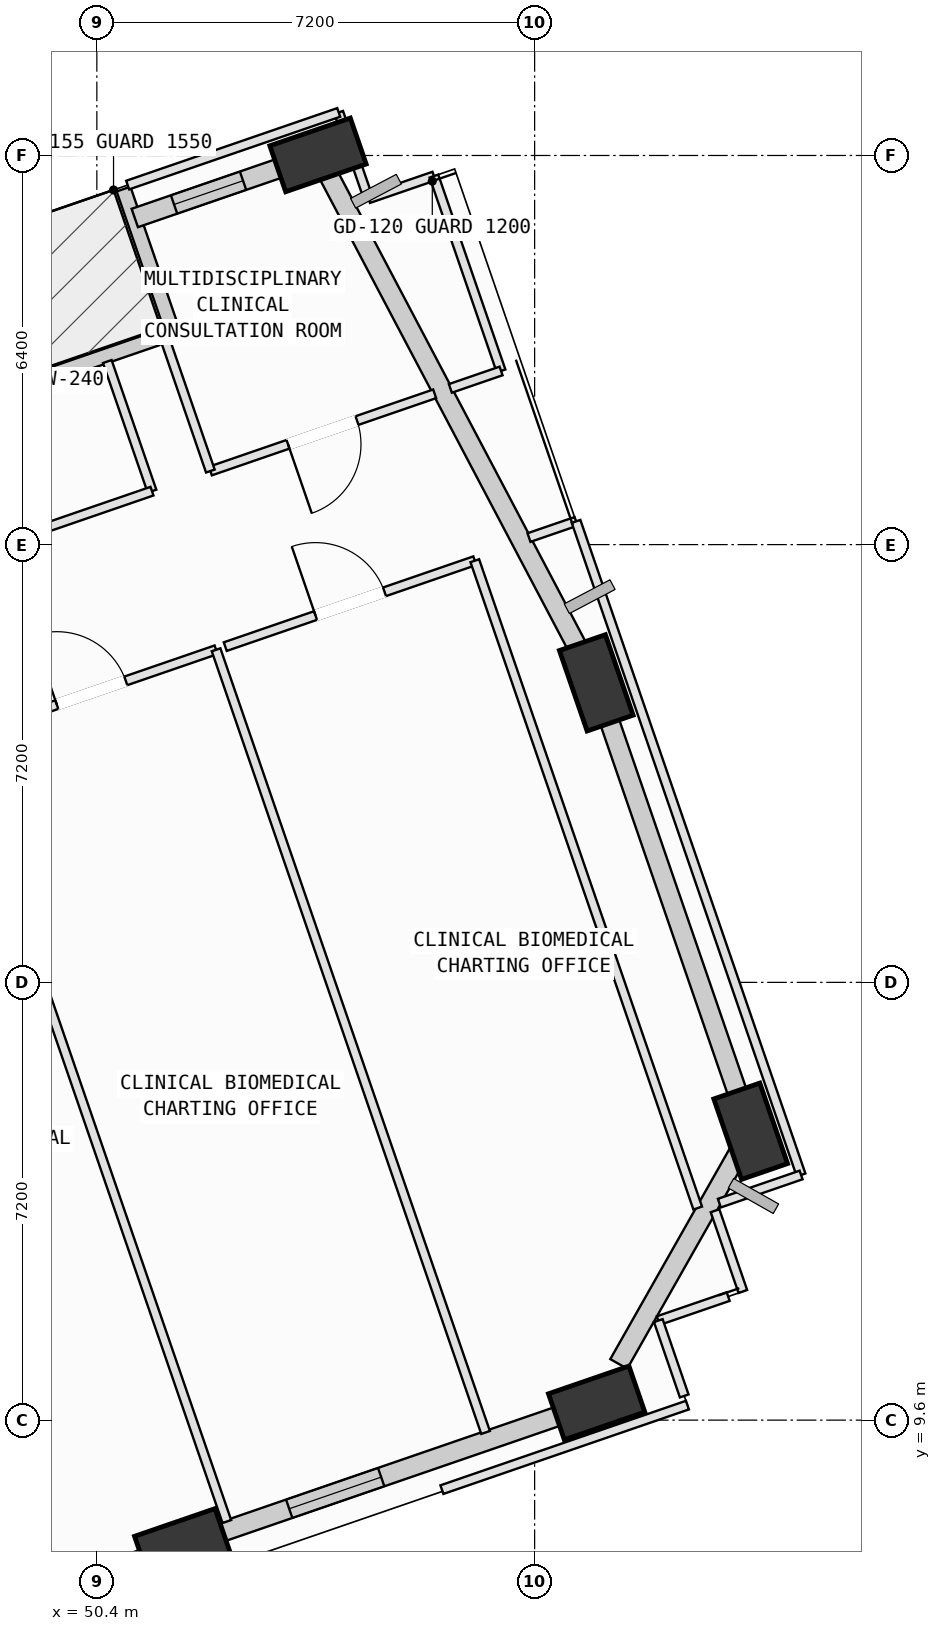
"""IFC4 building model, lengths in metres.
Left out: names, types, materials, properties, quantities, classifications, styles, units other than length and angle.
Written with IfcOpenShell. Run it as: python <this file> out.ifc"""

import sys

from ifc_helpers import new_model, si_unit, direction, frame, frame_2d, origin, origin_2d, place, context, subcontext, project, spatial, rectangle, extrude, element, fill, save


model = new_model("IFC4")
c1 = context("Model", 3, precision=1e-05, world=origin(), true_north=direction((0.0, 1.0)))
c2 = subcontext(c1, "Body", "Model", "MODEL_VIEW")
j1 = project(units=[si_unit("LENGTHUNIT", "METRE"), si_unit("PLANEANGLEUNIT", "RADIAN")], contexts=[c1])
p1 = place(None, origin())
s1 = spatial("IfcSite", under=j1, at=p1, CompositionType="ELEMENT")
p2 = place(p1, origin())
s2 = spatial("IfcBuilding", under=s1, at=p2, CompositionType="ELEMENT")
p3 = place(p2, frame((0.0, 0.0, 104.4)))
s3 = spatial("IfcBuildingStorey", under=s2, at=p3, CompositionType="ELEMENT", Elevation=104.4)
p4 = place(p3, frame((51.812, 7.539, 0.002), z_axis=(0.070545957231, 0.075710820594, 0.994631157547), x_axis=(-0.912513417221, 0.407656941268, 0.033690972483)))
e1 = element("IfcColumn", 1, at=p4, inside=s3, PredefinedType="COLUMN", context=c2, shape_type="SweptSolid", body=[
    extrude(rectangle(XDim=1.4, YDim=0.8, at=origin_2d()), origin(), (0.0, 0.0, 1.0), 4.018),
])
p5 = place(p3, frame((58.62, 9.883, 0.002), z_axis=(0.060529263913, 0.103469863963, 0.992789099186), x_axis=(-0.979335478518, 0.198441171378, 0.03902719587)))
e2 = element("IfcColumn", 2, at=p5, inside=s3, PredefinedType="COLUMN", context=c2, shape_type="SweptSolid", body=[
    extrude(rectangle(XDim=1.4, YDim=0.8, at=origin_2d()), origin(), (0.0, 0.0, 1.0), 4.025),
])
p6 = place(p3, frame((61.153, 14.351, 0.002), z_axis=(0.042023929581, 0.113701108175, 0.992625834513), x_axis=(-0.019996417235, -0.993208774939, 0.114614452328)))
e3 = element("IfcColumn", 3, at=p6, inside=s3, PredefinedType="COLUMN", context=c2, shape_type="SweptSolid", body=[
    extrude(rectangle(XDim=1.4, YDim=0.8, at=origin_2d()), origin(), (0.0, 0.0, 1.0), 4.026),
])
p7 = place(p3, frame((58.614, 21.726, 0.002), z_axis=(0.011848275116, 0.103231894472, 0.994586745508), x_axis=(0.216215786145, -0.971389712684, 0.098248460111)))
e4 = element("IfcColumn", 4, at=p7, inside=s3, PredefinedType="COLUMN", context=c2, shape_type="SweptSolid", body=[
    extrude(rectangle(XDim=1.4, YDim=0.8, at=origin_2d()), origin(), (0.0, 0.0, 1.0), 4.018),
])
p8 = place(p3, frame((54.037, 30.409, 0.002), z_axis=(-0.02385577357, 0.084225486278, 0.99616111625), x_axis=(-0.821349490594, -0.569712887579, 0.028499825041)))
e5 = element("IfcColumn", 5, at=p8, inside=s3, PredefinedType="COLUMN", context=c2, shape_type="SweptSolid", body=[
    extrude(rectangle(XDim=1.4, YDim=0.8, at=origin_2d()), origin(), (0.0, 0.0, 1.0), 4.012),
])
p9 = place(p3, frame((44.807, 25.126, 0.0), z_axis=(0.0, 0.0, 1.0), x_axis=(0.945511565556, 0.325588512391, 0.0)))
e6 = element("IfcWall", 6, at=p9, inside=s3, PredefinedType="SOLIDWALL", context=c2, shape_type="SweptSolid", body=[
    extrude(rectangle(XDim=6.96, YDim=0.24, at=frame_2d((3.48, 0.0))), origin(), (0.0, 0.0, 1.0), 2.945),
])
p10 = place(p9, frame((2.93, 0.0, 0.0)))
e7 = element("IfcOpeningElement", 7, at=p10, cuts=e6, PredefinedType="OPENING", context=c2, shape_type="SweptSolid", body=[
    extrude(rectangle(XDim=1.1, YDim=2.15, at=frame_2d((0.55, 1.075))), frame((0.0, 0.13, 0.0), z_axis=(0.0, -1.0, 0.0), x_axis=(1.0, 0.0, 0.0)), (0.0, 0.0, 1.0), 0.26),
])
p11 = place(p3, frame((51.653, 27.484, 0.0), z_axis=(0.0, 0.0, 1.0), x_axis=(-0.325587365823, 0.945511960377, 0.0)))
e8 = element("IfcWall", 8, at=p11, inside=s3, PredefinedType="SOLIDWALL", context=c2, shape_type="SweptSolid", body=[
    extrude(rectangle(XDim=2.5, YDim=0.24, at=frame_2d((1.25, 0.0))), origin(), (0.0, 0.0, 1.0), 3.165),
])
p12 = place(p3, frame((51.525, 7.44, 0.0), z_axis=(0.0, 0.0, 1.0), x_axis=(-0.945519755004, -0.325564729196, 0.0)))
e9 = element("IfcWall", 9, at=p12, inside=s3, PredefinedType="SOLIDWALL", context=c2, shape_type="SweptSolid", body=[
    extrude(rectangle(XDim=6.218, YDim=0.32, at=frame_2d((3.109, 0.0))), origin(), (0.0, 0.0, 1.0), 3.165),
])
p13 = place(p12, frame((0.908, 0.0, 0.75)))
e10 = element("IfcOpeningElement", 10, at=p13, cuts=e9, PredefinedType="OPENING", context=c2, shape_type="SweptSolid", body=[
    extrude(rectangle(XDim=1.2, YDim=1.75, at=frame_2d((0.6, 0.875))), frame((0.0, 0.17, 0.0), z_axis=(0.0, -1.0, 0.0), x_axis=(1.0, 0.0, 0.0)), (0.0, 0.0, 1.0), 0.34),
])
p14 = place(p3, frame((58.348, 9.789, 0.0), z_axis=(0.0, 0.0, 1.0), x_axis=(-0.945524166243, -0.325551917596, 0.0)))
e11 = element("IfcWall", 11, at=p14, inside=s3, PredefinedType="SOLIDWALL", context=c2, shape_type="SweptSolid", body=[
    extrude(rectangle(XDim=6.242, YDim=0.32, at=frame_2d((3.121, 0.0))), origin(), (0.0, 0.0, 1.0), 3.165),
])
p15 = place(p14, frame((3.46, 0.0, 0.75)))
e12 = element("IfcOpeningElement", 12, at=p15, cuts=e11, PredefinedType="OPENING", context=c2, shape_type="SweptSolid", body=[
    extrude(rectangle(XDim=1.6, YDim=1.95, at=frame_2d((0.8, 0.975))), frame((0.0, 0.17, 0.0), z_axis=(0.0, -1.0, 0.0), x_axis=(1.0, 0.0, 0.0)), (0.0, 0.0, 1.0), 0.34),
])
p16 = place(p3, frame((61.028, 14.131, 0.0), z_axis=(0.0, 0.0, 1.0), x_axis=(-0.493205746838, -0.86991269176, 0.0)))
e13 = element("IfcWall", 13, at=p16, inside=s3, PredefinedType="SOLIDWALL", context=c2, shape_type="SweptSolid", body=[
    extrude(rectangle(XDim=4.145, YDim=0.32, at=frame_2d((2.073, 0.0))), origin(), (0.0, 0.0, 1.0), 3.165),
])
p17 = place(p3, frame((58.711, 21.443, 0.0), z_axis=(0.0, 0.0, 1.0), x_axis=(0.325581466637, -0.945513991743, 0.0)))
e14 = element("IfcWall", 14, at=p17, inside=s3, PredefinedType="SOLIDWALL", context=c2, shape_type="SweptSolid", body=[
    extrude(rectangle(XDim=6.84, YDim=0.32, at=frame_2d((3.42, 0.0))), origin(), (0.0, 0.0, 1.0), 3.165),
])
p18 = place(p3, frame((54.188, 30.124, 0.0), z_axis=(0.0, 0.0, 1.0), x_axis=(0.466249594365, -0.884653217795, 0.0)))
e15 = element("IfcWall", 15, at=p18, inside=s3, PredefinedType="SOLIDWALL", context=c2, shape_type="SweptSolid", body=[
    extrude(rectangle(XDim=8.838, YDim=0.32, at=frame_2d((4.419, 0.0))), origin(), (0.0, 0.0, 1.0), 3.165),
])
p19 = place(p3, frame((51.024, 29.372, 0.0), z_axis=(0.0, 0.0, 1.0), x_axis=(0.945482121337, 0.325674006074, 0.0)))
e16 = element("IfcWall", 16, at=p19, inside=s3, PredefinedType="SOLIDWALL", context=c2, shape_type="SweptSolid", body=[
    extrude(rectangle(XDim=2.732, YDim=0.32, at=frame_2d((1.366, 0.0))), origin(), (0.0, 0.0, 1.0), 2.945),
])
p20 = place(p19, frame((0.683, 0.0, 0.75)))
e17 = element("IfcOpeningElement", 17, at=p20, cuts=e16, PredefinedType="OPENING", context=c2, shape_type="SweptSolid", body=[
    extrude(rectangle(XDim=1.2, YDim=1.75, at=frame_2d((0.6, 0.875))), frame((0.0, 0.17, 0.0), z_axis=(0.0, -1.0, 0.0), x_axis=(1.0, 0.0, 0.0)), (0.0, 0.0, 1.0), 0.34),
])
p21 = place(p3, frame((48.106, 20.805, 0.0), z_axis=(0.0, 0.0, 1.0), x_axis=(0.325540798332, -0.945527994626, 0.0)))
e18 = element("IfcWall", 18, at=p21, inside=s3, PredefinedType="PARTITIONING", context=c2, shape_type="SweptSolid", body=[
    extrude(rectangle(XDim=13.615, YDim=0.15, at=frame_2d((6.807, 0.0))), origin(), (0.0, 0.0, 1.0), 3.78),
])
p22 = place(p3, frame((52.52, 7.54, 0.0), z_axis=(0.0, 0.0, 1.0), x_axis=(-0.945396976023, -0.325921091256, 0.0)))
e19 = element("IfcWall", 19, at=p22, inside=s3, PredefinedType="PARTITIONING", context=c2, shape_type="SweptSolid", body=[
    extrude(rectangle(XDim=0.973, YDim=0.15, at=frame_2d((0.487, 0.0))), origin(), (0.0, 0.0, 1.0), 3.165),
])
p23 = place(p3, frame((48.257, 20.857, 0.0), z_axis=(0.0, 0.0, 1.0), x_axis=(0.945521123941, 0.325560753442, 0.0)))
e20 = element("IfcWall", 20, at=p23, inside=s3, PredefinedType="PARTITIONING", context=c2, shape_type="SweptSolid", body=[
    extrude(rectangle(XDim=4.341, YDim=0.15, at=frame_2d((2.17, 0.0))), origin(), (0.0, 0.0, 1.0), 3.78),
])
p24 = place(p23, frame((1.57, 0.0, 0.0)))
e21 = element("IfcOpeningElement", 21, at=p24, cuts=e20, PredefinedType="OPENING", context=c2, shape_type="SweptSolid", body=[
    extrude(rectangle(XDim=1.2, YDim=2.15, at=frame_2d((0.6, 1.075))), frame((0.0, 0.085, 0.0), z_axis=(0.0, -1.0, 0.0), x_axis=(1.0, 0.0, 0.0)), (0.0, 0.0, 1.0), 0.17),
])
p25 = place(p3, frame((52.361, 22.27, 0.0), z_axis=(0.0, 0.0, 1.0), x_axis=(0.325524766407, -0.94553351419, 0.0)))
e22 = element("IfcWall", 22, at=p25, inside=s3, PredefinedType="PARTITIONING", context=c2, shape_type="SweptSolid", body=[
    extrude(rectangle(XDim=13.615, YDim=0.15, at=frame_2d((6.807, 0.0))), origin(), (0.0, 0.0, 1.0), 3.78),
])
p26 = place(p3, frame((52.512, 22.322, 0.0), z_axis=(0.0, 0.0, 1.0), x_axis=(0.945521123941, 0.325560753442, 0.0)))
e23 = element("IfcWall", 23, at=p26, inside=s3, PredefinedType="PARTITIONING", context=c2, shape_type="SweptSolid", body=[
    extrude(rectangle(XDim=4.341, YDim=0.15, at=frame_2d((2.17, 0.0))), origin(), (0.0, 0.0, 1.0), 3.78),
])
p27 = place(p26, frame((1.57, 0.0, 0.0)))
e24 = element("IfcOpeningElement", 24, at=p27, cuts=e23, PredefinedType="OPENING", context=c2, shape_type="SweptSolid", body=[
    extrude(rectangle(XDim=1.2, YDim=2.15, at=frame_2d((0.6, 1.075))), frame((0.0, 0.085, 0.0), z_axis=(0.0, -1.0, 0.0), x_axis=(1.0, 0.0, 0.0)), (0.0, 0.0, 1.0), 0.17),
])
p28 = place(p3, frame((56.616, 23.735, 0.0), z_axis=(0.0, 0.0, 1.0), x_axis=(0.325559014634, -0.945521722643, 0.0)))
e25 = element("IfcWall", 25, at=p28, inside=s3, PredefinedType="PARTITIONING", context=c2, shape_type="SweptSolid", body=[
    extrude(rectangle(XDim=11.261, YDim=0.15, at=frame_2d((5.63, 0.0))), origin(), (0.0, 0.0, 1.0), 3.78),
])
p29 = place(p3, frame((60.783, 11.632, 0.0), z_axis=(0.0, 0.0, 1.0), x_axis=(-0.945667292467, -0.325135928434, 0.0)))
e26 = element("IfcWall", 26, at=p29, inside=s3, PredefinedType="PARTITIONING", context=c2, shape_type="SweptSolid", body=[
    extrude(rectangle(XDim=1.215, YDim=0.15, at=frame_2d((0.607, 0.0))), origin(), (0.0, 0.0, 1.0), 3.78),
])
p30 = place(p3, frame((59.634, 11.237, 0.0), z_axis=(0.0, 0.0, 1.0), x_axis=(0.325157882432, -0.945659744037, 0.0)))
e27 = element("IfcWall", 27, at=p30, inside=s3, PredefinedType="PARTITIONING", context=c2, shape_type="SweptSolid", body=[
    extrude(rectangle(XDim=1.31, YDim=0.15, at=frame_2d((0.655, 0.0))), origin(), (0.0, 0.0, 1.0), 3.78),
])
p31 = place(p3, frame((50.572, 27.011, 0.0), z_axis=(0.0, 0.0, 1.0), x_axis=(0.325857226799, -0.945418990577, 0.0)))
e28 = element("IfcWall", 28, at=p31, inside=s3, PredefinedType="PARTITIONING", context=c2, shape_type="SweptSolid", body=[
    extrude(rectangle(XDim=2.255, YDim=0.15, at=frame_2d((1.127, 0.0))), origin(), (0.0, 0.0, 1.0), 3.78),
])
p32 = place(p3, frame((51.307, 24.879, 0.0), z_axis=(0.0, 0.0, 1.0), x_axis=(-0.94554945318, -0.325478465634, 0.0)))
e29 = element("IfcWall", 29, at=p32, inside=s3, PredefinedType="PARTITIONING", context=c2, shape_type="SweptSolid", body=[
    extrude(rectangle(XDim=6.332, YDim=0.15, at=frame_2d((3.166, 0.0))), origin(), (0.0, 0.0, 1.0), 3.78),
])
p33 = place(p32, frame((2.706, 0.0, 0.0)))
e30 = element("IfcOpeningElement", 30, at=p33, cuts=e29, PredefinedType="OPENING", context=c2, shape_type="SweptSolid", body=[
    extrude(rectangle(XDim=0.92, YDim=2.1, at=frame_2d((0.46, 1.05))), frame((0.0, 0.085, 0.0), z_axis=(0.0, -1.0, 0.0), x_axis=(1.0, 0.0, 0.0)), (0.0, 0.0, 1.0), 0.17),
])
p34 = place(p3, frame((54.378, 31.108, 0.0), z_axis=(0.0, 0.0, 1.0), x_axis=(0.326025796862, -0.945360872778, 0.0)))
e31 = element("IfcWall", 31, at=p34, inside=s3, PredefinedType="PARTITIONING", context=c2, shape_type="SweptSolid", body=[
    extrude(rectangle(XDim=1.5, YDim=0.15, at=frame_2d((0.75, 0.0))), origin(), (0.0, 0.0, 1.0), 3.165),
])
p35 = place(p3, frame((54.867, 29.69, 0.0), z_axis=(0.0, 0.0, 1.0), x_axis=(0.945464036643, 0.325726504011, 0.0)))
e32 = element("IfcWall", 32, at=p35, inside=s3, PredefinedType="PARTITIONING", context=c2, shape_type="SweptSolid", body=[
    extrude(rectangle(XDim=1.139, YDim=0.15, at=frame_2d((0.57, 0.0))), origin(), (0.0, 0.0, 1.0), 3.78),
])
p36 = place(p3, frame((55.944, 30.061, 0.0), z_axis=(0.0, 0.0, 1.0), x_axis=(0.325675490584, -0.945481609992, 0.0)))
e33 = element("IfcWall", 33, at=p36, inside=s3, PredefinedType="PARTITIONING", context=c2, shape_type="SweptSolid", body=[
    extrude(rectangle(XDim=3.39, YDim=0.15, at=frame_2d((1.695, 0.0))), origin(), (0.0, 0.0, 1.0), 3.78),
])
p37 = place(p3, frame((57.048, 26.856, 0.0), z_axis=(0.0, 0.0, 1.0), x_axis=(-0.94562275495, -0.325265438251, 0.0)))
e34 = element("IfcWall", 34, at=p37, inside=s3, PredefinedType="PARTITIONING", context=c2, shape_type="SweptSolid", body=[
    extrude(rectangle(XDim=0.882, YDim=0.15, at=frame_2d((0.441, 0.0))), origin(), (0.0, 0.0, 1.0), 3.78),
])
p38 = place(p3, frame((55.956, 26.48, 0.0), z_axis=(0.0, 0.0, 1.0), x_axis=(-0.94553379692, -0.325523945174, 0.0)))
e35 = element("IfcWall", 35, at=p38, inside=s3, PredefinedType="PARTITIONING", context=c2, shape_type="SweptSolid", body=[
    extrude(rectangle(XDim=3.901, YDim=0.15, at=frame_2d((1.951, 0.0))), origin(), (0.0, 0.0, 1.0), 3.78),
])
p39 = place(p38, frame((1.351, 0.0, 0.0)))
e36 = element("IfcOpeningElement", 36, at=p39, cuts=e35, PredefinedType="OPENING", context=c2, shape_type="SweptSolid", body=[
    extrude(rectangle(XDim=1.2, YDim=2.15, at=frame_2d((0.6, 1.075))), frame((0.0, 0.085, 0.0), z_axis=(0.0, -1.0, 0.0), x_axis=(1.0, 0.0, 0.0)), (0.0, 0.0, 1.0), 0.17),
])
p40 = place(p3, frame((52.267, 25.21, 0.0), z_axis=(0.0, 0.0, 1.0), x_axis=(-0.325593639514, 0.945509800006, 0.0)))
e37 = element("IfcWall", 37, at=p40, inside=s3, PredefinedType="PARTITIONING", context=c2, shape_type="SweptSolid", body=[
    extrude(rectangle(XDim=2.35, YDim=0.15, at=frame_2d((1.175, 0.0))), origin(), (0.0, 0.0, 1.0), 3.78),
])
p41 = place(p3, frame((50.907, 29.913, 0.0), z_axis=(0.0, 0.0, 1.0), x_axis=(0.945545303861, 0.325490519596, 0.0)))
e38 = element("IfcWall", 38, at=p41, inside=s3, PredefinedType="PARTITIONING", context=c2, shape_type="SweptSolid", body=[
    extrude(rectangle(XDim=3.671, YDim=0.15, at=frame_2d((1.835, 0.0))), origin(), (0.0, 0.0, 1.0), 2.945),
])
p42 = place(p3, frame((60.113, 9.847, 0.0), z_axis=(0.0, 0.0, 1.0), x_axis=(-0.945556910298, -0.325456801108, 0.0)))
e39 = element("IfcWall", 39, at=p42, inside=s3, PredefinedType="PARTITIONING", context=c2, shape_type="SweptSolid", body=[
    extrude(rectangle(XDim=4.271, YDim=0.15, at=frame_2d((2.135, 0.0))), origin(), (0.0, 0.0, 1.0), 3.78),
])
p43 = place(p3, frame((60.567, 13.044, 0.0), z_axis=(0.0, 0.0, 1.0), x_axis=(0.325444142701, -0.945561267175, 0.0)))
e40 = element("IfcWall", 40, at=p43, inside=s3, PredefinedType="PARTITIONING", context=c2, shape_type="SweptSolid", body=[
    extrude(rectangle(XDim=1.404, YDim=0.15, at=frame_2d((0.702, 0.0))), origin(), (0.0, 0.0, 1.0), 3.78),
])
p44 = place(p3, frame((57.507, 24.116, 0.0), z_axis=(0.0, 0.0, 1.0), x_axis=(0.945657936565, 0.325163139071, 0.0)))
e41 = element("IfcWall", 41, at=p44, inside=s3, PredefinedType="PARTITIONING", context=c2, shape_type="SweptSolid", body=[
    extrude(rectangle(XDim=0.818, YDim=0.15, at=frame_2d((0.409, 0.0))), origin(), (0.0, 0.0, 1.0), 3.78),
])
p45 = place(p3, frame((58.281, 24.382, 0.0), z_axis=(0.0, 0.0, 1.0), x_axis=(0.325521437067, -0.945534660396, 0.0)))
e42 = element("IfcWall", 42, at=p45, inside=s3, PredefinedType="PARTITIONING", context=c2, shape_type="SweptSolid", body=[
    extrude(rectangle(XDim=11.369, YDim=0.15, at=frame_2d((5.685, 0.0))), origin(), (0.0, 0.0, 1.0), 3.165),
])
p46 = place(p3, frame((61.982, 13.632, 0.0), z_axis=(0.0, 0.0, 1.0), x_axis=(-0.945440490134, -0.325794842831, 0.0)))
e43 = element("IfcWall", 43, at=p46, inside=s3, PredefinedType="PARTITIONING", context=c2, shape_type="SweptSolid", body=[
    extrude(rectangle(XDim=1.422, YDim=0.15, at=frame_2d((0.711, 0.0))), origin(), (0.0, 0.0, 1.0), 3.78),
])
p47 = place(p15, origin())
e44 = element("IfcWindow", 44, at=p47, inside=s3, PartitioningType="SINGLE_PANEL", PredefinedType="WINDOW", context=c2, shape_type="SweptSolid", body=[
    extrude(rectangle(XDim=1.6, YDim=1.95, at=frame_2d((0.8, 0.975))), frame((0.0, 0.03, 0.0), z_axis=(0.0, -1.0, 0.0), x_axis=(1.0, 0.0, 0.0)), (0.0, 0.0, 1.0), 0.06),
])
fill(e12, e44)
p48 = place(p20, origin())
e45 = element("IfcWindow", 45, at=p48, inside=s3, PartitioningType="SINGLE_PANEL", PredefinedType="WINDOW", context=c2, shape_type="SweptSolid", body=[
    extrude(rectangle(XDim=1.2, YDim=1.75, at=frame_2d((0.6, 0.875))), frame((0.0, 0.03, 0.0), z_axis=(0.0, -1.0, 0.0), x_axis=(1.0, 0.0, 0.0)), (0.0, 0.0, 1.0), 0.06),
])
fill(e17, e45)
p49 = place(p24, origin())
e46 = element("IfcDoor", 46, at=p49, inside=s3, OperationType="SINGLE_SWING_LEFT", PredefinedType="DOOR", context=c2, shape_type="SweptSolid", body=[
    extrude(rectangle(XDim=1.2, YDim=2.15, at=frame_2d((0.6, 1.075))), frame((0.0, 0.025, 0.0), z_axis=(0.0, -1.0, 0.0), x_axis=(1.0, 0.0, 0.0)), (0.0, 0.0, 1.0), 0.05),
])
fill(e21, e46)
p50 = place(p27, origin())
e47 = element("IfcDoor", 47, at=p50, inside=s3, OperationType="SINGLE_SWING_LEFT", PredefinedType="DOOR", context=c2, shape_type="SweptSolid", body=[
    extrude(rectangle(XDim=1.2, YDim=2.15, at=frame_2d((0.6, 1.075))), frame((0.0, 0.025, 0.0), z_axis=(0.0, -1.0, 0.0), x_axis=(1.0, 0.0, 0.0)), (0.0, 0.0, 1.0), 0.05),
])
fill(e24, e47)
p51 = place(p39, origin())
e48 = element("IfcDoor", 48, at=p51, inside=s3, OperationType="SINGLE_SWING_RIGHT", PredefinedType="DOOR", context=c2, shape_type="SweptSolid", body=[
    extrude(rectangle(XDim=1.2, YDim=2.15, at=frame_2d((0.6, 1.075))), frame((0.0, 0.025, 0.0), z_axis=(0.0, -1.0, 0.0), x_axis=(1.0, 0.0, 0.0)), (0.0, 0.0, 1.0), 0.05),
])
fill(e36, e48)
save(model, sys.argv[1])
